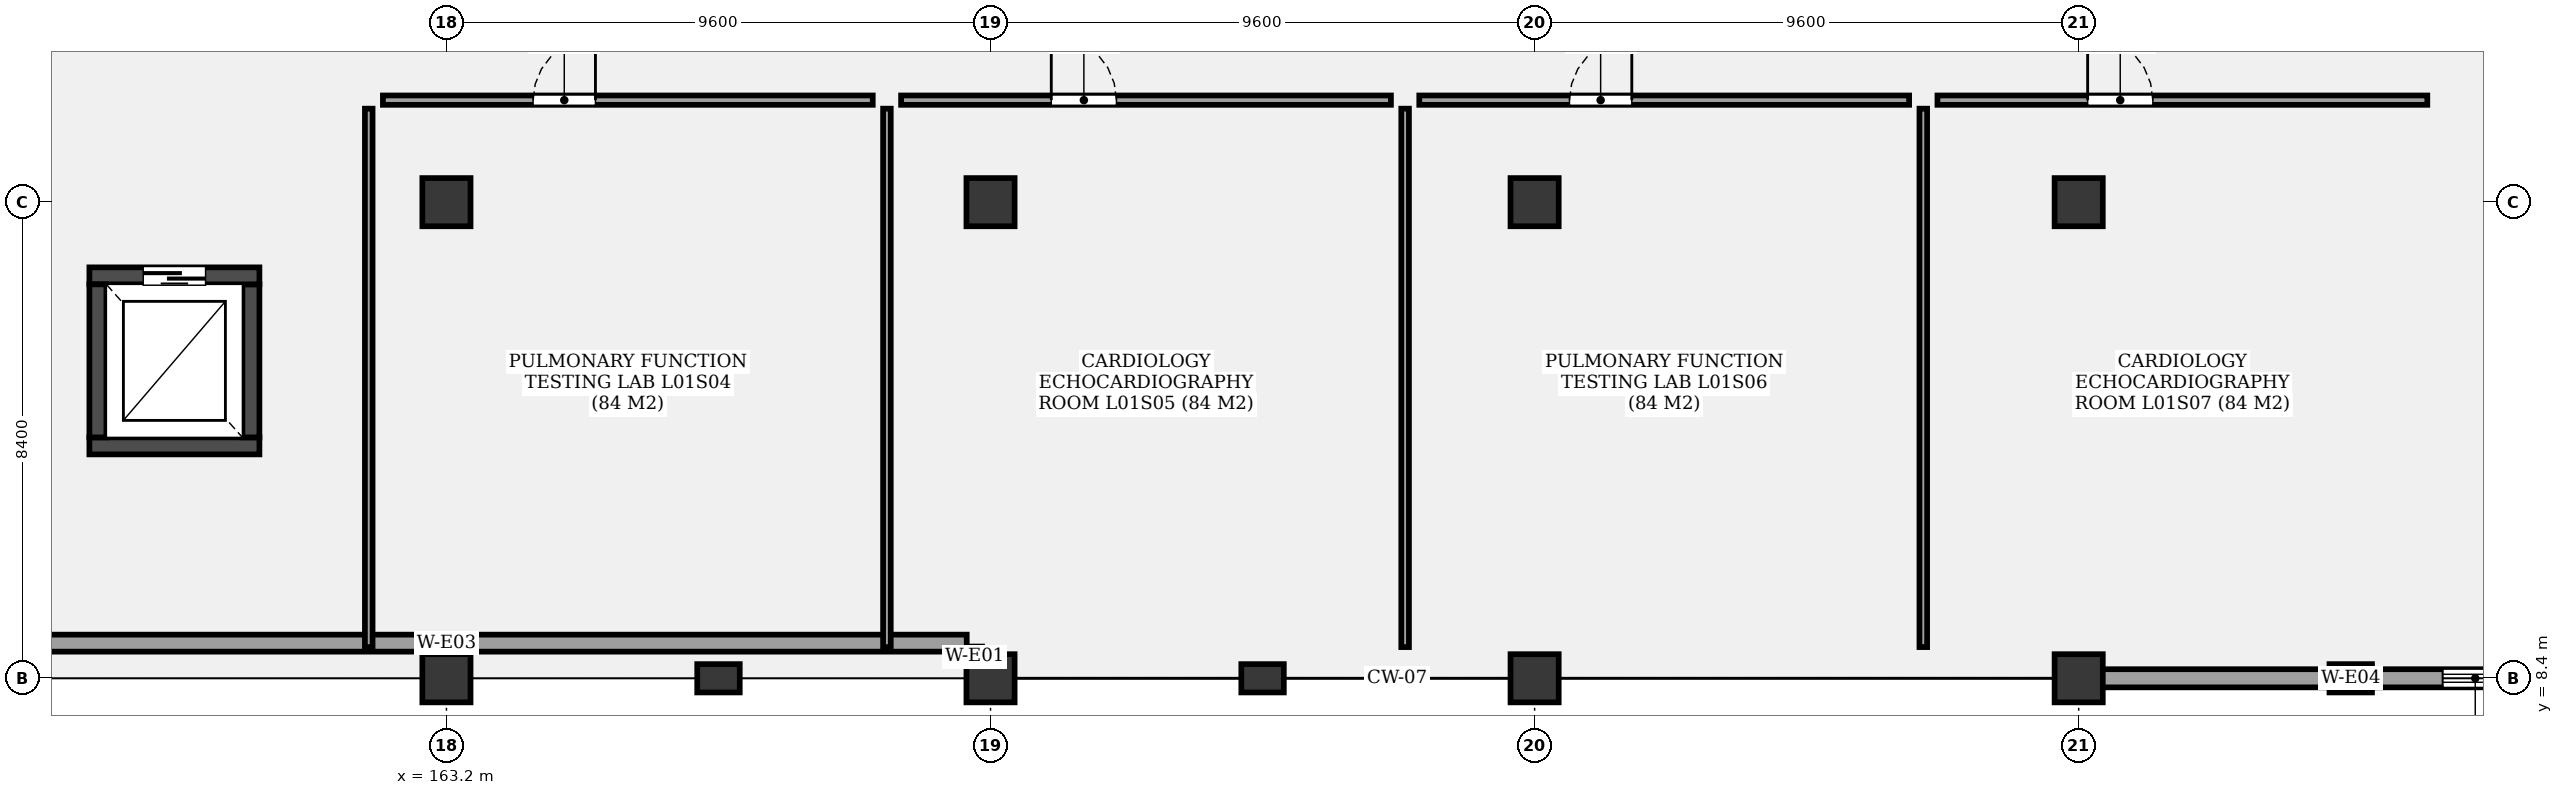
"""IFC4 building model, lengths in metres.
Left out: names, types, materials, properties, quantities, classifications, styles, units other than length and angle.
Written with IfcOpenShell. Run it as: python <this file> out.ifc"""

import sys

from ifc_helpers import new_model, si_unit, direction, frame, frame_2d, origin, origin_2d, place, context, subcontext, project, spatial, rectangle, extrude, element, fill, save


model = new_model("IFC4")
c1 = context("Model", 3, precision=1e-05, world=origin(), true_north=direction((0.0, 1.0)))
c2 = subcontext(c1, "Body", "Model", "MODEL_VIEW")
j1 = project(units=[si_unit("LENGTHUNIT", "METRE"), si_unit("PLANEANGLEUNIT", "RADIAN")], contexts=[c1])
p1 = place(None, origin())
s1 = spatial("IfcSite", under=j1, at=p1, CompositionType="ELEMENT")
p2 = place(p1, origin())
s2 = spatial("IfcBuilding", under=s1, at=p2, CompositionType="ELEMENT")
p3 = place(p2, frame((0.0, 0.0, 5.1)))
s3 = spatial("IfcBuildingStorey", under=s2, at=p3, CompositionType="ELEMENT", Elevation=5.1)
for number, where, z_axis, x_axis in (
    (1, (163.2, 8.4, 0.0), (0.0, 0.0, 1.0), (1.0, 0.0, 0.0)),
    (2, (163.2, 16.8, 0.0), (0.0, 0.0, 1.0), (1.0, 0.0, 0.0)),
    (3, (172.8, 8.4, 0.0), (0.0, 0.0, 1.0), (1.0, 0.0, 0.0)),
    (4, (172.8, 16.8, 0.0), (0.0, 0.0, 1.0), (1.0, 0.0, 0.0)),
    (5, (182.4, 8.4, 0.0), (0.0, 0.0, 1.0), (1.0, 0.0, 0.0)),
    (6, (182.4, 16.8, 0.0), (0.0, 0.0, 1.0), (1.0, 0.0, 0.0)),
    (7, (192.0, 8.4, 0.0), (0.0, 0.0, 1.0), (1.0, 0.0, 0.0)),
    (8, (192.0, 16.8, 0.0), (0.0, 0.0, 1.0), (1.0, 0.0, 0.0)),
):
    element("IfcColumn", number, at=place(p3, frame(where, z_axis=z_axis, x_axis=x_axis)), inside=s3, PredefinedType="COLUMN", context=c2, shape_type="SweptSolid", body=[
        extrude(rectangle(XDim=0.85, YDim=0.85, at=origin_2d()), origin(), (0.0, 0.0, 1.0), 4.8),
    ])
for number, where, z_axis, x_axis in (
    (9, (168.0, 8.4, 0.0), (0.0, 0.0, 1.0), (1.0, 0.0, 0.0)),
    (10, (177.6, 8.4, 0.0), (0.0, 0.0, 1.0), (1.0, 0.0, 0.0)),
    (11, (196.8, 8.4, 0.0), (0.0, 0.0, 1.0), (1.0, 0.0, 0.0)),
):
    element("IfcColumn", number, at=place(p3, frame(where, z_axis=z_axis, x_axis=x_axis)), inside=s3, PredefinedType="PILASTER", context=c2, shape_type="SweptSolid", body=[
        extrude(rectangle(XDim=0.75, YDim=0.5, at=origin_2d()), origin(), (0.0, 0.0, 1.0), 4.8),
    ])
p4 = place(p3, frame((156.9, 12.5, 0.0), z_axis=(0.0, 0.0, 1.0), x_axis=(1.0, 0.0, 0.0)))
e12 = element("IfcWall", 12, at=p4, inside=s3, PredefinedType="SHEAR", context=c2, shape_type="SweptSolid", body=[
    extrude(rectangle(XDim=3.0, YDim=0.3, at=frame_2d((1.5, 0.0))), origin(), (0.0, 0.0, 1.0), 4.8),
])
p5 = place(p3, frame((159.75, 12.65, 0.0), z_axis=(0.0, 0.0, 1.0), x_axis=(0.0, 1.0, 0.0)))
e13 = element("IfcWall", 13, at=p5, inside=s3, PredefinedType="SHEAR", context=c2, shape_type="SweptSolid", body=[
    extrude(rectangle(XDim=2.7, YDim=0.3, at=frame_2d((1.35, 0.0))), origin(), (0.0, 0.0, 1.0), 4.8),
])
p6 = place(p3, frame((159.9, 15.5, 0.0), z_axis=(0.0, 0.0, 1.0), x_axis=(-1.0, 0.0, 0.0)))
e14 = element("IfcWall", 14, at=p6, inside=s3, PredefinedType="SHEAR", context=c2, shape_type="SweptSolid", body=[
    extrude(rectangle(XDim=3.0, YDim=0.3, at=frame_2d((1.5, 0.0))), origin(), (0.0, 0.0, 1.0), 4.8),
])
p7 = place(p6, frame((0.95, 0.0, 0.0)))
e15 = element("IfcOpeningElement", 15, at=p7, cuts=e14, PredefinedType="OPENING", context=c2, shape_type="SweptSolid", body=[
    extrude(rectangle(XDim=1.1, YDim=2.2, at=frame_2d((0.55, 1.1))), frame((0.0, 0.16, 0.0), z_axis=(0.0, -1.0, 0.0), x_axis=(1.0, 0.0, 0.0)), (0.0, 0.0, 1.0), 0.32),
])
p8 = place(p3, frame((157.05, 15.35, 0.0), z_axis=(0.0, 0.0, 1.0), x_axis=(0.0, -1.0, 0.0)))
e16 = element("IfcWall", 16, at=p8, inside=s3, PredefinedType="SHEAR", context=c2, shape_type="SweptSolid", body=[
    extrude(rectangle(XDim=2.7, YDim=0.3, at=frame_2d((1.35, 0.0))), origin(), (0.0, 0.0, 1.0), 4.8),
])
p9 = place(p3, frame((172.52, 8.6, 0.0), z_axis=(0.0, 0.0, 1.0), x_axis=(0.0, 1.0, 0.0)))
e17 = element("IfcWall", 17, at=p9, inside=s3, PredefinedType="SOLIDWALL", context=c2, shape_type="SweptSolid", body=[
    extrude(rectangle(XDim=0.36, YDim=0.26, at=frame_2d((0.18, 0.0))), origin(), (0.0, 0.0, 1.0), 3.94),
])
p10 = place(p3, frame((172.38, 9.02, 0.0), z_axis=(0.0, 0.0, 1.0), x_axis=(-1.0, 0.0, 0.0)))
e18 = element("IfcWall", 18, at=p10, inside=s3, PredefinedType="SOLIDWALL", context=c2, shape_type="SweptSolid", body=[
    extrude(rectangle(XDim=18.36, YDim=0.3, at=frame_2d((9.18, 0.0))), origin(), (0.0, 0.0, 1.0), 3.94),
])
p11 = place(p3, frame((201.6, 8.4, 0.0), z_axis=(0.0, 0.0, 1.0), x_axis=(-1.0, 0.0, 0.0)))
e19 = element("IfcWall", 19, at=p11, inside=s3, PredefinedType="SOLIDWALL", context=c2, shape_type="SweptSolid", body=[
    extrude(rectangle(XDim=9.6, YDim=0.32, at=frame_2d((4.8, 0.0))), origin(), (0.0, 0.0, 1.0), 3.94),
])
p12 = place(p11, frame((2.028, 0.0, 0.85)))
e20 = element("IfcOpeningElement", 20, at=p12, cuts=e19, PredefinedType="OPENING", context=c2, shape_type="SweptSolid", body=[
    extrude(rectangle(XDim=1.15, YDim=1.2, at=frame_2d((0.575, 0.6))), frame((0.0, 0.17, 0.0), z_axis=(0.0, -1.0, 0.0), x_axis=(1.0, 0.0, 0.0)), (0.0, 0.0, 1.0), 0.34),
])
p13 = place(p3, frame((162.079, 18.6, 0.0), z_axis=(0.0, 0.0, 1.0), x_axis=(1.0, 0.0, 0.0)))
e21 = element("IfcWall", 21, at=p13, inside=s3, PredefinedType="PARTITIONING", context=c2, shape_type="SweptSolid", body=[
    extrude(rectangle(XDim=8.643, YDim=0.165, at=frame_2d((4.321, 0.0))), origin(), (0.0, 0.0, 1.0), 3.68),
])
p14 = place(p13, frame((2.65, 0.0, 0.0)))
e22 = element("IfcOpeningElement", 22, at=p14, cuts=e21, PredefinedType="OPENING", context=c2, shape_type="SweptSolid", body=[
    extrude(rectangle(XDim=1.1, YDim=2.1, at=frame_2d((0.55, 1.05))), frame((0.0, 0.093, 0.0), z_axis=(0.0, -1.0, 0.0), x_axis=(1.0, 0.0, 0.0)), (0.0, 0.0, 1.0), 0.185),
])
p15 = place(p3, frame((161.829, 8.95, 0.0), z_axis=(0.0, 0.0, 1.0), x_axis=(0.0, 1.0, 0.0)))
e23 = element("IfcWall", 23, at=p15, inside=s3, PredefinedType="PARTITIONING", context=c2, shape_type="SweptSolid", body=[
    extrude(rectangle(XDim=9.5, YDim=0.135, at=frame_2d((4.75, 0.0))), origin(), (0.0, 0.0, 1.0), 3.68),
])
p16 = place(p3, frame((171.222, 18.6, 0.0), z_axis=(0.0, 0.0, 1.0), x_axis=(1.0, 0.0, 0.0)))
e24 = element("IfcWall", 24, at=p16, inside=s3, PredefinedType="PARTITIONING", context=c2, shape_type="SweptSolid", body=[
    extrude(rectangle(XDim=8.643, YDim=0.165, at=frame_2d((4.322, 0.0))), origin(), (0.0, 0.0, 1.0), 3.68),
])
p17 = place(p16, frame((2.65, 0.0, 0.0)))
e25 = element("IfcOpeningElement", 25, at=p17, cuts=e24, PredefinedType="OPENING", context=c2, shape_type="SweptSolid", body=[
    extrude(rectangle(XDim=1.15, YDim=2.2, at=frame_2d((0.575, 1.1))), frame((0.0, 0.093, 0.0), z_axis=(0.0, -1.0, 0.0), x_axis=(1.0, 0.0, 0.0)), (0.0, 0.0, 1.0), 0.185),
])
p18 = place(p3, frame((170.972, 8.95, 0.0), z_axis=(0.0, 0.0, 1.0), x_axis=(0.0, 1.0, 0.0)))
e26 = element("IfcWall", 26, at=p18, inside=s3, PredefinedType="PARTITIONING", context=c2, shape_type="SweptSolid", body=[
    extrude(rectangle(XDim=9.5, YDim=0.135, at=frame_2d((4.75, 0.0))), origin(), (0.0, 0.0, 1.0), 3.68),
])
p19 = place(p3, frame((180.365, 18.6, 0.0), z_axis=(0.0, 0.0, 1.0), x_axis=(1.0, 0.0, 0.0)))
e27 = element("IfcWall", 27, at=p19, inside=s3, PredefinedType="PARTITIONING", context=c2, shape_type="SweptSolid", body=[
    extrude(rectangle(XDim=8.643, YDim=0.165, at=frame_2d((4.322, 0.0))), origin(), (0.0, 0.0, 1.0), 3.68),
])
p20 = place(p19, frame((2.65, 0.0, 0.0)))
e28 = element("IfcOpeningElement", 28, at=p20, cuts=e27, PredefinedType="OPENING", context=c2, shape_type="SweptSolid", body=[
    extrude(rectangle(XDim=1.1, YDim=2.1, at=frame_2d((0.55, 1.05))), frame((0.0, 0.093, 0.0), z_axis=(0.0, -1.0, 0.0), x_axis=(1.0, 0.0, 0.0)), (0.0, 0.0, 1.0), 0.185),
])
p21 = place(p3, frame((180.115, 8.95, 0.0), z_axis=(0.0, 0.0, 1.0), x_axis=(0.0, 1.0, 0.0)))
e29 = element("IfcWall", 29, at=p21, inside=s3, PredefinedType="PARTITIONING", context=c2, shape_type="SweptSolid", body=[
    extrude(rectangle(XDim=9.5, YDim=0.135, at=frame_2d((4.75, 0.0))), origin(), (0.0, 0.0, 1.0), 3.68),
])
p22 = place(p3, frame((189.508, 18.6, 0.0), z_axis=(0.0, 0.0, 1.0), x_axis=(1.0, 0.0, 0.0)))
e30 = element("IfcWall", 30, at=p22, inside=s3, PredefinedType="PARTITIONING", context=c2, shape_type="SweptSolid", body=[
    extrude(rectangle(XDim=8.643, YDim=0.165, at=frame_2d((4.321, 0.0))), origin(), (0.0, 0.0, 1.0), 3.68),
])
p23 = place(p22, frame((2.65, 0.0, 0.0)))
e31 = element("IfcOpeningElement", 31, at=p23, cuts=e30, PredefinedType="OPENING", context=c2, shape_type="SweptSolid", body=[
    extrude(rectangle(XDim=1.15, YDim=2.2, at=frame_2d((0.575, 1.1))), frame((0.0, 0.093, 0.0), z_axis=(0.0, -1.0, 0.0), x_axis=(1.0, 0.0, 0.0)), (0.0, 0.0, 1.0), 0.185),
])
p24 = place(p3, frame((189.258, 8.95, 0.0), z_axis=(0.0, 0.0, 1.0), x_axis=(0.0, 1.0, 0.0)))
e32 = element("IfcWall", 32, at=p24, inside=s3, PredefinedType="PARTITIONING", context=c2, shape_type="SweptSolid", body=[
    extrude(rectangle(XDim=9.5, YDim=0.135, at=frame_2d((4.75, 0.0))), origin(), (0.0, 0.0, 1.0), 3.68),
])
p25 = place(p7, origin())
e33 = element("IfcDoor", 33, at=p25, inside=s3, OperationType="SLIDING_TO_LEFT", PredefinedType="DOOR", context=c2, shape_type="SweptSolid", body=[
    extrude(rectangle(XDim=1.1, YDim=2.2, at=frame_2d((0.55, 1.1))), frame((0.0, 0.025, 0.0), z_axis=(0.0, -1.0, 0.0), x_axis=(1.0, 0.0, 0.0)), (0.0, 0.0, 1.0), 0.05),
])
fill(e15, e33)
p26 = place(p12, origin())
e34 = element("IfcWindow", 34, at=p26, inside=s3, PartitioningType="SINGLE_PANEL", PredefinedType="WINDOW", context=c2, shape_type="SweptSolid", body=[
    extrude(rectangle(XDim=1.15, YDim=1.2, at=frame_2d((0.575, 0.6))), frame((0.0, 0.03, 0.0), z_axis=(0.0, -1.0, 0.0), x_axis=(1.0, 0.0, 0.0)), (0.0, 0.0, 1.0), 0.06),
])
fill(e20, e34)
p27 = place(p14, origin())
e35 = element("IfcDoor", 35, at=p27, inside=s3, OperationType="SINGLE_SWING_RIGHT", PredefinedType="DOOR", context=c2, shape_type="SweptSolid", body=[
    extrude(rectangle(XDim=1.1, YDim=2.1, at=frame_2d((0.55, 1.05))), frame((0.0, 0.025, 0.0), z_axis=(0.0, -1.0, 0.0), x_axis=(1.0, 0.0, 0.0)), (0.0, 0.0, 1.0), 0.05),
])
fill(e22, e35)
p28 = place(p17, origin())
e36 = element("IfcDoor", 36, at=p28, inside=s3, OperationType="SINGLE_SWING_LEFT", PredefinedType="DOOR", context=c2, shape_type="SweptSolid", body=[
    extrude(rectangle(XDim=1.15, YDim=2.2, at=frame_2d((0.575, 1.1))), frame((0.0, 0.025, 0.0), z_axis=(0.0, -1.0, 0.0), x_axis=(1.0, 0.0, 0.0)), (0.0, 0.0, 1.0), 0.05),
])
fill(e25, e36)
p29 = place(p20, origin())
e37 = element("IfcDoor", 37, at=p29, inside=s3, OperationType="SINGLE_SWING_RIGHT", PredefinedType="DOOR", context=c2, shape_type="SweptSolid", body=[
    extrude(rectangle(XDim=1.1, YDim=2.1, at=frame_2d((0.55, 1.05))), frame((0.0, 0.025, 0.0), z_axis=(0.0, -1.0, 0.0), x_axis=(1.0, 0.0, 0.0)), (0.0, 0.0, 1.0), 0.05),
])
fill(e28, e37)
p30 = place(p23, origin())
e38 = element("IfcDoor", 38, at=p30, inside=s3, OperationType="SINGLE_SWING_LEFT", PredefinedType="DOOR", context=c2, shape_type="SweptSolid", body=[
    extrude(rectangle(XDim=1.15, YDim=2.2, at=frame_2d((0.575, 1.1))), frame((0.0, 0.025, 0.0), z_axis=(0.0, -1.0, 0.0), x_axis=(1.0, 0.0, 0.0)), (0.0, 0.0, 1.0), 0.05),
])
fill(e31, e38)
save(model, sys.argv[1])
